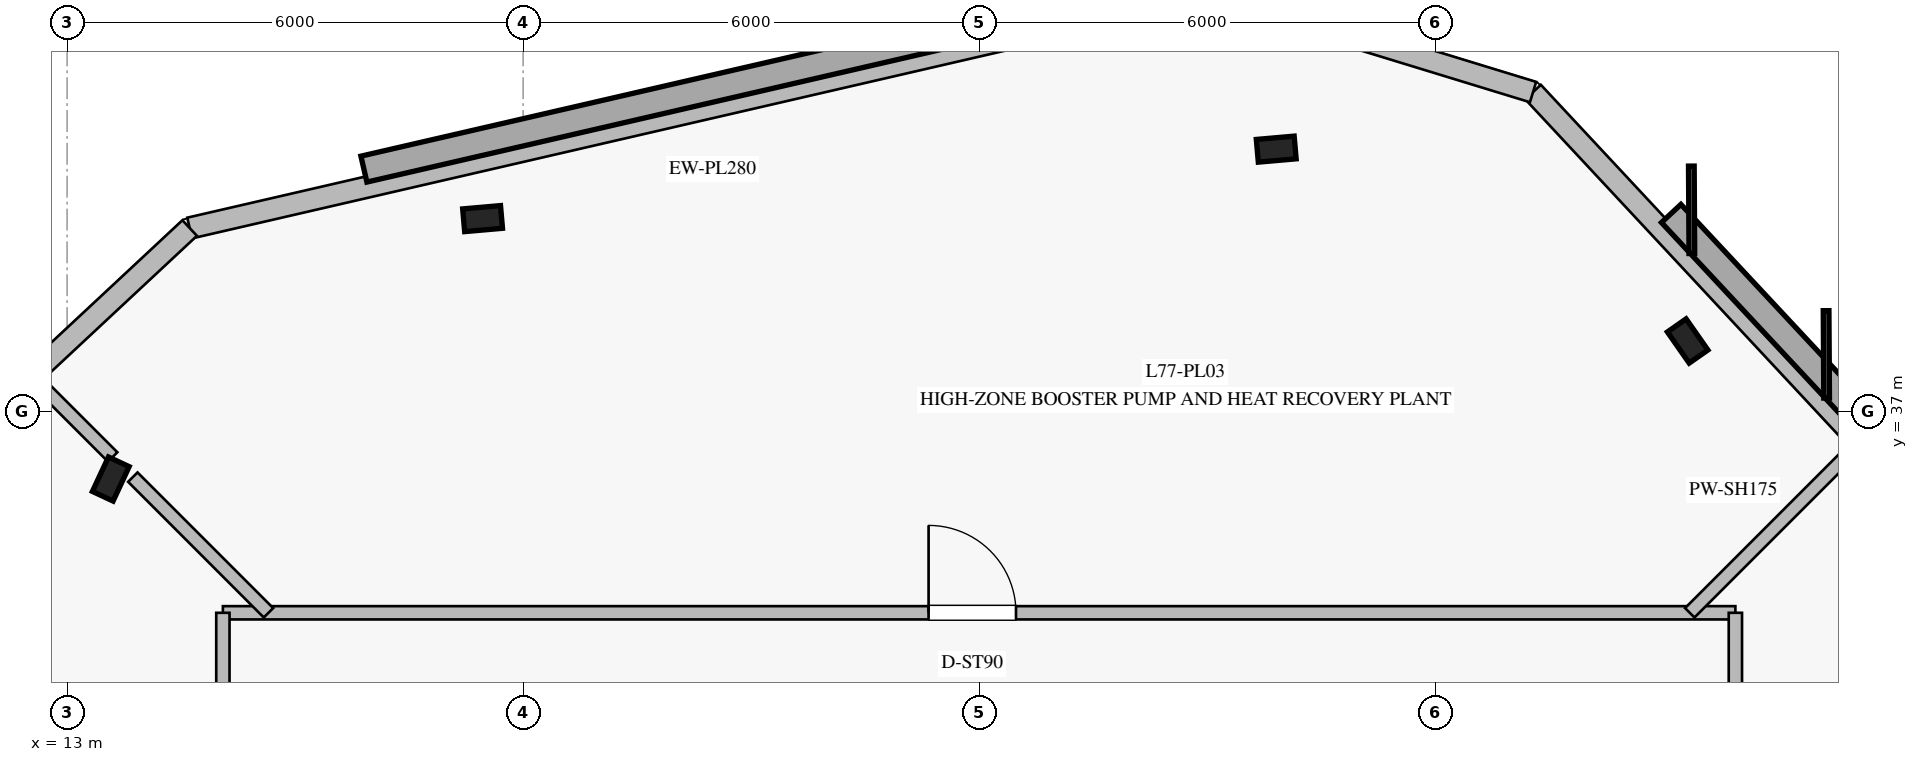
"""IFC4 building model, lengths in metres.
Left out: names, types, materials, properties, quantities, classifications, styles, units other than length and angle.
Written with IfcOpenShell. Run it as: python <this file> out.ifc"""

import sys

from ifc_helpers import new_model, si_unit, direction, frame, frame_2d, origin, origin_2d, place, context, subcontext, project, spatial, rectangle, i_section, extrude, element, fill, save


model = new_model("IFC4")
c1 = context("Model", 3, precision=1e-05, world=origin(), true_north=direction((0.0, 1.0)))
c2 = subcontext(c1, "Body", "Model", "MODEL_VIEW")
j1 = project(units=[si_unit("LENGTHUNIT", "METRE"), si_unit("PLANEANGLEUNIT", "RADIAN")], contexts=[c1])
p1 = place(None, origin())
s1 = spatial("IfcSite", under=j1, at=p1, CompositionType="ELEMENT")
p2 = place(p1, origin())
s2 = spatial("IfcBuilding", under=s1, at=p2, CompositionType="ELEMENT")
p3 = place(p2, frame((0.0, 0.0, 318.2)))
s3 = spatial("IfcBuildingStorey", under=s2, at=p3, CompositionType="ELEMENT", Elevation=318.2)
for number, where, z_axis, x_axis in (
    (1, (28.909, 40.45, 0.0), (0.0, 0.0, 1.0), (0.996, 0.087, 0.0)),
    (2, (18.467, 39.536, 0.0), (0.0, 0.0, 1.0), (0.996, 0.087, 0.0)),
    (3, (13.575, 36.11, 0.0), (0.0, 0.0, 1.0), (0.423, 0.906, 0.0)),
    (4, (34.322, 37.926, 0.0), (0.0, 0.0, 1.0), (-0.574, 0.819, 0.0)),
):
    element("IfcColumn", number, at=place(p3, frame(where, z_axis=z_axis, x_axis=x_axis)), inside=s3, PredefinedType="COLUMN", context=c2, shape_type="SweptSolid", body=[
        extrude(i_section(OverallWidth=0.3, OverallDepth=0.5, WebThickness=0.014, FlangeThickness=0.028, at=origin_2d()), origin(), (0.0, 0.0, 1.0), 4.4),
    ])
p4 = place(p3, frame((28.018, 42.507, 0.0), z_axis=(0.0, 0.0, 1.0), x_axis=(-0.974367263291, -0.224963188605, 0.0)))
e5 = element("IfcWall", 5, at=p4, inside=s3, PredefinedType="STANDARD", context=c2, shape_type="SweptSolid", body=[
    extrude(rectangle(XDim=13.758, YDim=0.28, at=frame_2d((6.879, 0.0))), origin(), (0.0, 0.0, 1.0), 4.14),
])
p5 = place(p3, frame((14.613, 39.412, 0.0), z_axis=(0.0, 0.0, 1.0), x_axis=(-0.731311609652, -0.682043495378, 0.0)))
e6 = element("IfcWall", 6, at=p5, inside=s3, PredefinedType="STANDARD", context=c2, shape_type="SweptSolid", body=[
    extrude(rectangle(XDim=4.465, YDim=0.28, at=frame_2d((2.232, 0.0))), origin(), (0.0, 0.0, 1.0), 4.14),
])
p6 = place(p3, frame((41.671, 31.14, 0.0), z_axis=(0.0, 0.0, 1.0), x_axis=(-0.682027341853, 0.731326674588, 0.0)))
e7 = element("IfcWall", 7, at=p6, inside=s3, PredefinedType="STANDARD", context=c2, shape_type="SweptSolid", body=[
    extrude(rectangle(XDim=13.757, YDim=0.28, at=frame_2d((6.879, 0.0))), origin(), (0.0, 0.0, 1.0), 4.14),
])
p7 = place(p3, frame((32.288, 41.201, 0.0), z_axis=(0.0, 0.0, 1.0), x_axis=(-0.956262395438, 0.292510223876, 0.0)))
e8 = element("IfcWall", 8, at=p7, inside=s3, PredefinedType="STANDARD", context=c2, shape_type="SweptSolid", body=[
    extrude(rectangle(XDim=4.465, YDim=0.28, at=frame_2d((2.233, 0.0))), origin(), (0.0, 0.0, 1.0), 4.14),
])
p8 = place(p3, frame((15.05, 34.35, 0.0), z_axis=(0.0, 0.0, 1.0), x_axis=(1.0, 0.0, 0.0)))
e9 = element("IfcWall", 9, at=p8, inside=s3, PredefinedType="PARTITIONING", context=c2, shape_type="SweptSolid", body=[
    extrude(rectangle(XDim=19.9, YDim=0.175, at=frame_2d((9.95, 0.0))), origin(), (0.0, 0.0, 1.0), 3.64),
])
p9 = place(p8, frame((9.285, 0.0, 0.0)))
e10 = element("IfcOpeningElement", 10, at=p9, cuts=e9, PredefinedType="OPENING", context=c2, shape_type="SweptSolid", body=[
    extrude(rectangle(XDim=1.15, YDim=2.2, at=frame_2d((0.575, 1.1))), frame((0.0, 0.098, 0.0), z_axis=(0.0, -1.0, 0.0), x_axis=(1.0, 0.0, 0.0)), (0.0, 0.0, 1.0), 0.195),
])
p10 = place(p3, frame((34.95, 34.35, 0.0), z_axis=(0.0, 0.0, 1.0), x_axis=(0.0, -1.0, 0.0)))
e11 = element("IfcWall", 11, at=p10, inside=s3, PredefinedType="PARTITIONING", context=c2, shape_type="SweptSolid", body=[
    extrude(rectangle(XDim=18.7, YDim=0.175, at=frame_2d((9.35, 0.0))), origin(), (0.0, 0.0, 1.0), 3.64),
])
p11 = place(p10, frame((8.775, 0.0, 0.0)))
e12 = element("IfcOpeningElement", 12, at=p11, cuts=e11, PredefinedType="OPENING", context=c2, shape_type="SweptSolid", body=[
    extrude(rectangle(XDim=1.15, YDim=2.2, at=frame_2d((0.575, 1.1))), frame((0.0, 0.098, 0.0), z_axis=(0.0, -1.0, 0.0), x_axis=(1.0, 0.0, 0.0)), (0.0, 0.0, 1.0), 0.195),
])
p12 = place(p3, frame((15.05, 15.65, 0.0), z_axis=(0.0, 0.0, 1.0), x_axis=(0.0, 1.0, 0.0)))
e13 = element("IfcWall", 13, at=p12, inside=s3, PredefinedType="PARTITIONING", context=c2, shape_type="SweptSolid", body=[
    extrude(rectangle(XDim=18.7, YDim=0.175, at=frame_2d((9.35, 0.0))), origin(), (0.0, 0.0, 1.0), 3.64),
])
p13 = place(p12, frame((8.775, 0.0, 0.0)))
e14 = element("IfcOpeningElement", 14, at=p13, cuts=e13, PredefinedType="OPENING", context=c2, shape_type="SweptSolid", body=[
    extrude(rectangle(XDim=1.15, YDim=2.2, at=frame_2d((0.575, 1.1))), frame((0.0, 0.098, 0.0), z_axis=(0.0, -1.0, 0.0), x_axis=(1.0, 0.0, 0.0)), (0.0, 0.0, 1.0), 0.195),
])
p14 = place(p3, frame((34.35, 34.35, 0.0), z_axis=(0.0, 0.0, 1.0), x_axis=(0.707106781187, 0.707106781187, 0.0)))
e15 = element("IfcWall", 15, at=p14, inside=s3, PredefinedType="PARTITIONING", context=c2, shape_type="SweptSolid", body=[
    extrude(rectangle(XDim=3.096, YDim=0.175, at=frame_2d((1.548, 0.0))), origin(), (0.0, 0.0, 1.0), 3.64),
])
p15 = place(p3, frame((15.65, 34.35, 0.0), z_axis=(0.0, 0.0, 1.0), x_axis=(-0.707106781187, 0.707106781187, 0.0)))
e16 = element("IfcWall", 16, at=p15, inside=s3, PredefinedType="PARTITIONING", context=c2, shape_type="SweptSolid", body=[
    extrude(rectangle(XDim=2.524, YDim=0.175, at=frame_2d((1.262, 0.0))), origin(), (0.0, 0.0, 1.0), 3.64),
])
p16 = place(p3, frame((13.6, 36.4, 0.0), z_axis=(0.0, 0.0, 1.0), x_axis=(-0.707106781187, 0.707106781187, 0.0)))
e17 = element("IfcWall", 17, at=p16, inside=s3, PredefinedType="PARTITIONING", context=c2, shape_type="SweptSolid", body=[
    extrude(rectangle(XDim=1.453, YDim=0.175, at=frame_2d((0.726, 0.0))), origin(), (0.0, 0.0, 1.0), 3.64),
])
p17 = place(p9, origin())
e18 = element("IfcDoor", 18, at=p17, inside=s3, OperationType="SINGLE_SWING_LEFT", PredefinedType="DOOR", context=c2, shape_type="SweptSolid", body=[
    extrude(rectangle(XDim=1.15, YDim=2.2, at=frame_2d((0.575, 1.1))), frame((0.0, 0.025, 0.0), z_axis=(0.0, -1.0, 0.0), x_axis=(1.0, 0.0, 0.0)), (0.0, 0.0, 1.0), 0.05),
])
fill(e10, e18)
save(model, sys.argv[1])
